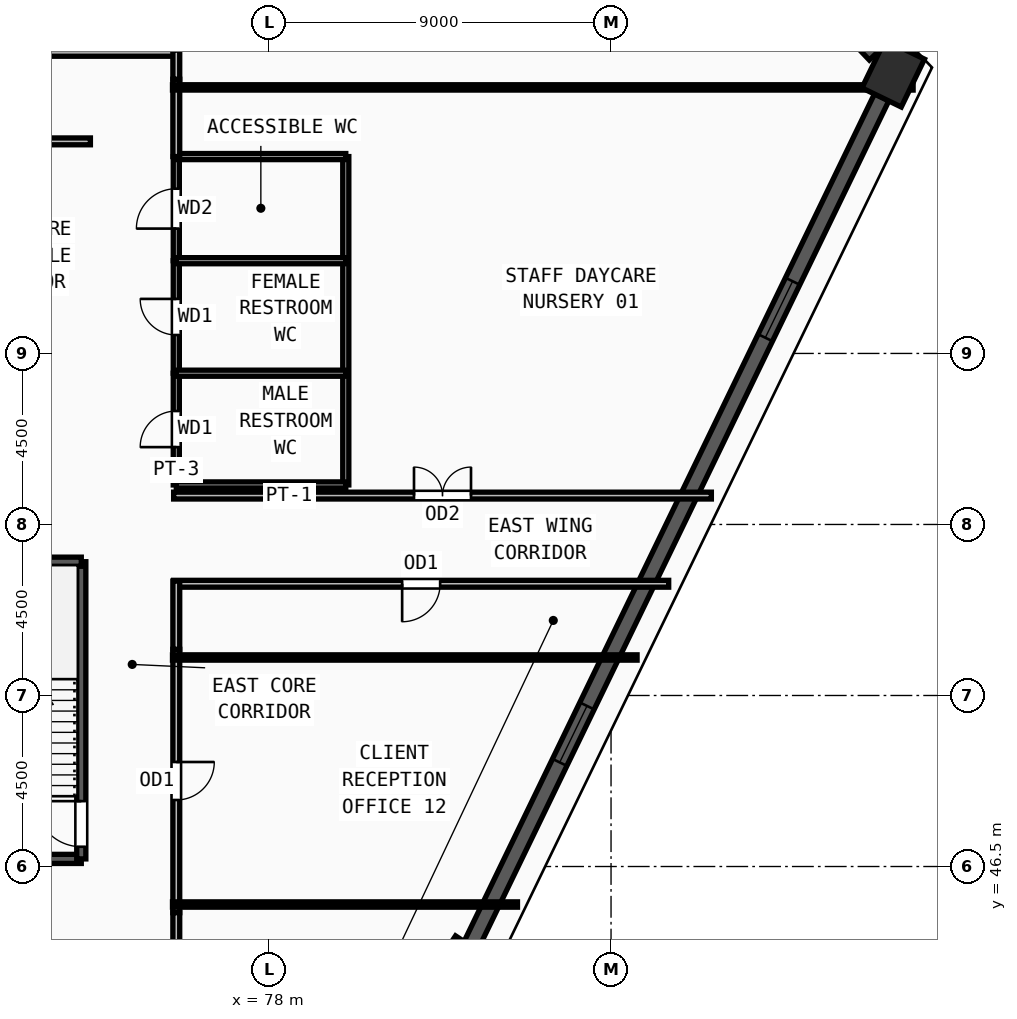
"""IFC4 building model, lengths in metres.
Left out: names, types, materials, properties, quantities, classifications, styles, units other than length and angle.
Written with IfcOpenShell. Run it as: python <this file> out.ifc"""

import sys

from ifc_helpers import new_model, si_unit, direction, frame, frame_2d, origin, origin_2d, place, context, subcontext, project, spatial, rectangle, extrude, source, transform, mapped, element, fill, save


model = new_model("IFC4")
c1 = context("Model", 3, precision=1e-05, world=origin(), true_north=direction((0.0, 1.0)))
c2 = subcontext(c1, "Body", "Model", "MODEL_VIEW")
j1 = project(units=[si_unit("LENGTHUNIT", "METRE"), si_unit("PLANEANGLEUNIT", "RADIAN")], contexts=[c1])
p1 = place(None, origin())
s1 = spatial("IfcSite", under=j1, at=p1, CompositionType="ELEMENT")
p2 = place(p1, origin())
s2 = spatial("IfcBuilding", under=s1, at=p2, CompositionType="ELEMENT")
p3 = place(p2, frame((0.0, 0.0, 177.75)))
s3 = spatial("IfcBuildingStorey", under=s2, at=p3, CompositionType="ELEMENT", Elevation=177.75)
m1 = source(origin(), c2, "Body", "SweptSolid", [
    extrude(rectangle(XDim=1.4, YDim=1.15, at=origin_2d()), origin(), (0.0, 0.0, 1.0), 3.75),
])
for number, where, z_axis, x_axis in (
    (1, (94.425, 67.365, 0.0), (0.0, 0.0, 1.0), (0.436, 0.9, 0.0)),
    (2, (83.002, 43.774, 0.0), (0.0, 0.0, 1.0), (0.552, 0.834, 0.0)),
):
    element("IfcColumn", number, at=place(p3, frame(where, z_axis=z_axis, x_axis=x_axis)), inside=s3, PredefinedType="COLUMN", context=c2, shape_type="MappedRepresentation", body=[
        mapped(m1, transform((0.0, 0.0, 0.0), x_axis=(1.0, 0.0, 0.0), y_axis=(0.0, 1.0, 0.0), z_axis=(0.0, 0.0, 1.0), scale=1.0)),
    ])
p4 = place(p3, frame((83.303, 44.395, 0.0), z_axis=(0.0, 0.0, 1.0), x_axis=(0.435791696433, 0.90004755281, 0.0)))
e3 = element("IfcWall", 3, at=p4, inside=s3, PredefinedType="SOLIDWALL", context=c2, shape_type="SweptSolid", body=[
    extrude(rectangle(XDim=24.831, YDim=0.42, at=frame_2d((12.416, 0.0))), origin(), (0.0, 0.0, 1.0), 3.57),
])
m2 = source(origin(), c2, "Body", "SweptSolid", [
    extrude(rectangle(XDim=1.65, YDim=1.95, at=frame_2d((0.825, 0.975))), frame((0.0, 0.22, 0.0), z_axis=(0.0, -1.0, 0.0), x_axis=(1.0, 0.0, 0.0)), (0.0, 0.0, 1.0), 0.44),
])
p5 = place(p4, frame((5.383, 0.0, 0.55)))
e4 = element("IfcOpeningElement", 4, at=p5, cuts=e3, PredefinedType="OPENING", context=c2, shape_type="MappedRepresentation", body=[
    mapped(m2, transform((0.0, 0.0, 0.0), x_axis=(1.0, 0.0, 0.0), y_axis=(0.0, 1.0, 0.0), z_axis=(0.0, 0.0, 1.0), scale=1.0)),
])
p6 = place(p4, frame((17.798, 0.0, 0.55)))
e5 = element("IfcOpeningElement", 5, at=p6, cuts=e3, PredefinedType="OPENING", context=c2, shape_type="MappedRepresentation", body=[
    mapped(m2, transform((0.0, 0.0, 0.0), x_axis=(1.0, 0.0, 0.0), y_axis=(0.0, 1.0, 0.0), z_axis=(0.0, 0.0, 1.0), scale=1.0)),
])
p7 = place(p3, frame((93.949, 67.865, 0.0), z_axis=(0.0, 0.0, 1.0), x_axis=(-0.68923569457, 0.724537202171, 0.0)))
e6 = element("IfcWall", 6, at=p7, inside=s3, PredefinedType="SOLIDWALL", context=c2, shape_type="SweptSolid", body=[
    extrude(rectangle(XDim=4.419, YDim=0.42, at=frame_2d((2.209, 0.0))), origin(), (0.0, 0.0, 1.0), 3.57),
])
m3 = source(origin(), c2, "Body", "SweptSolid", [
    extrude(rectangle(XDim=1.2, YDim=1.9, at=frame_2d((0.6, 0.95))), frame((0.0, 0.22, 0.0), z_axis=(0.0, -1.0, 0.0), x_axis=(1.0, 0.0, 0.0)), (0.0, 0.0, 1.0), 0.44),
])
p8 = place(p7, frame((1.61, 0.0, 0.55)))
e7 = element("IfcOpeningElement", 7, at=p8, cuts=e6, PredefinedType="OPENING", context=c2, shape_type="MappedRepresentation", body=[
    mapped(m3, transform((0.0, 0.0, 0.0), x_axis=(1.0, 0.0, 0.0), y_axis=(0.0, 1.0, 0.0), z_axis=(0.0, 0.0, 1.0), scale=1.0)),
])
p9 = place(p3, frame((69.62, 46.7, 0.0), z_axis=(0.0, 0.0, 1.0), x_axis=(1.0, 0.0, 0.0)))
e8 = element("IfcWall", 8, at=p9, inside=s3, PredefinedType="SOLIDWALL", context=c2, shape_type="SweptSolid", body=[
    extrude(rectangle(XDim=3.44, YDim=0.24, at=frame_2d((1.72, 0.0))), origin(), (0.0, 0.0, 1.0), 3.57),
])
p10 = place(p3, frame((73.06, 46.7, 0.0), z_axis=(0.0, 0.0, 1.0), x_axis=(0.0, 1.0, 0.0)))
e9 = element("IfcWall", 9, at=p10, inside=s3, PredefinedType="SOLIDWALL", context=c2, shape_type="SweptSolid", body=[
    extrude(rectangle(XDim=7.82, YDim=0.24, at=frame_2d((3.91, 0.0))), origin(), (0.0, 0.0, 1.0), 3.57),
])
m4 = source(origin(), c2, "Body", "SweptSolid", [
    extrude(rectangle(XDim=1.2, YDim=2.2, at=frame_2d((0.6, 1.1))), frame((0.0, 0.13, 0.0), z_axis=(0.0, -1.0, 0.0), x_axis=(1.0, 0.0, 0.0)), (0.0, 0.0, 1.0), 0.26),
])
p11 = place(p10, frame((0.32, 0.0, 0.0)))
e10 = element("IfcOpeningElement", 10, at=p11, cuts=e9, PredefinedType="OPENING", context=c2, shape_type="MappedRepresentation", body=[
    mapped(m4, transform((0.0, 0.0, 0.0), x_axis=(1.0, 0.0, 0.0), y_axis=(0.0, 1.0, 0.0), z_axis=(0.0, 0.0, 1.0), scale=1.0)),
])
p12 = place(p3, frame((73.06, 54.52, 0.0), z_axis=(0.0, 0.0, 1.0), x_axis=(-1.0, 0.0, 0.0)))
e11 = element("IfcWall", 11, at=p12, inside=s3, PredefinedType="SOLIDWALL", context=c2, shape_type="SweptSolid", body=[
    extrude(rectangle(XDim=3.44, YDim=0.24, at=frame_2d((1.72, 0.0))), origin(), (0.0, 0.0, 1.0), 3.57),
])
p13 = place(p3, frame((75.56, 56.54, 0.0), z_axis=(0.0, 0.0, 1.0), x_axis=(0.0, 1.0, 0.0)))
e12 = element("IfcWall", 12, at=p13, inside=s3, PredefinedType="PARTITIONING", context=c2, shape_type="SweptSolid", body=[
    extrude(rectangle(XDim=2.94, YDim=0.16, at=frame_2d((1.47, 0.0))), origin(), (0.0, 0.0, 1.0), 3.57),
])
m5 = source(origin(), c2, "Body", "SweptSolid", [
    extrude(rectangle(XDim=0.95, YDim=2.15, at=frame_2d((0.475, 1.075))), frame((0.0, 0.09, 0.0), z_axis=(0.0, -1.0, 0.0), x_axis=(1.0, 0.0, 0.0)), (0.0, 0.0, 1.0), 0.18),
])
p14 = place(p13, frame((0.995, 0.0, 0.0)))
e13 = element("IfcOpeningElement", 13, at=p14, cuts=e12, PredefinedType="OPENING", context=c2, shape_type="MappedRepresentation", body=[
    mapped(m5, transform((0.0, 0.0, 0.0), x_axis=(1.0, 0.0, 0.0), y_axis=(0.0, 1.0, 0.0), z_axis=(0.0, 0.0, 1.0), scale=1.0)),
])
p15 = place(p3, frame((75.56, 59.48, 0.0), z_axis=(0.0, 0.0, 1.0), x_axis=(0.0, 1.0, 0.0)))
e14 = element("IfcWall", 14, at=p15, inside=s3, PredefinedType="PARTITIONING", context=c2, shape_type="SweptSolid", body=[
    extrude(rectangle(XDim=2.96, YDim=0.16, at=frame_2d((1.48, 0.0))), origin(), (0.0, 0.0, 1.0), 3.57),
])
p16 = place(p15, frame((1.005, 0.0, 0.0)))
e15 = element("IfcOpeningElement", 15, at=p16, cuts=e14, PredefinedType="OPENING", context=c2, shape_type="MappedRepresentation", body=[
    mapped(m5, transform((0.0, 0.0, 0.0), x_axis=(1.0, 0.0, 0.0), y_axis=(0.0, 1.0, 0.0), z_axis=(0.0, 0.0, 1.0), scale=1.0)),
])
p17 = place(p3, frame((75.56, 62.44, 0.0), z_axis=(0.0, 0.0, 1.0), x_axis=(0.0, 1.0, 0.0)))
e16 = element("IfcWall", 16, at=p17, inside=s3, PredefinedType="PARTITIONING", context=c2, shape_type="SweptSolid", body=[
    extrude(rectangle(XDim=2.74, YDim=0.16, at=frame_2d((1.37, 0.0))), origin(), (0.0, 0.0, 1.0), 3.57),
])
m6 = source(origin(), c2, "Body", "SweptSolid", [
    extrude(rectangle(XDim=1.05, YDim=2.15, at=frame_2d((0.525, 1.075))), frame((0.0, 0.09, 0.0), z_axis=(0.0, -1.0, 0.0), x_axis=(1.0, 0.0, 0.0)), (0.0, 0.0, 1.0), 0.18),
])
p18 = place(p17, frame((0.845, 0.0, 0.0)))
e17 = element("IfcOpeningElement", 17, at=p18, cuts=e16, PredefinedType="OPENING", context=c2, shape_type="MappedRepresentation", body=[
    mapped(m6, transform((0.0, 0.0, 0.0), x_axis=(1.0, 0.0, 0.0), y_axis=(0.0, 1.0, 0.0), z_axis=(0.0, 0.0, 1.0), scale=1.0)),
])
p19 = place(p3, frame((69.46, 65.58, 0.0), z_axis=(0.0, 0.0, 1.0), x_axis=(1.0, 0.0, 0.0)))
e18 = element("IfcWall", 18, at=p19, inside=s3, PredefinedType="PARTITIONING", context=c2, shape_type="SweptSolid", body=[
    extrude(rectangle(XDim=3.84, YDim=0.18, at=frame_2d((1.92, 0.0))), origin(), (0.0, 0.0, 1.0), 3.57),
])
m7 = source(origin(), c2, "Body", "SweptSolid", [
    extrude(rectangle(XDim=1.3, YDim=2.2, at=frame_2d((0.65, 1.1))), frame((0.0, 0.1, 0.0), z_axis=(0.0, -1.0, 0.0), x_axis=(1.0, 0.0, 0.0)), (0.0, 0.0, 1.0), 0.2),
])
p20 = place(p19, frame((1.27, 0.0, 0.0)))
e19 = element("IfcOpeningElement", 19, at=p20, cuts=e18, PredefinedType="OPENING", context=c2, shape_type="MappedRepresentation", body=[
    mapped(m7, transform((0.0, 0.0, 0.0), x_axis=(1.0, 0.0, 0.0), y_axis=(0.0, 1.0, 0.0), z_axis=(0.0, 0.0, 1.0), scale=1.0)),
])
p21 = place(p3, frame((75.49, 56.26, 0.0), z_axis=(0.0, 0.0, 1.0), x_axis=(1.0, 0.0, 0.0)))
e20 = element("IfcWall", 20, at=p21, inside=s3, PredefinedType="PARTITIONING", context=c2, shape_type="SweptSolid", body=[
    extrude(rectangle(XDim=14.15, YDim=0.18, at=frame_2d((7.075, 0.0))), origin(), (0.0, 0.0, 1.0), 3.57),
])
m8 = source(origin(), c2, "Body", "SweptSolid", [
    extrude(rectangle(XDim=1.5, YDim=2.2, at=frame_2d((0.75, 1.1))), frame((0.0, 0.1, 0.0), z_axis=(0.0, -1.0, 0.0), x_axis=(1.0, 0.0, 0.0)), (0.0, 0.0, 1.0), 0.2),
])
p22 = place(p21, frame((6.325, 0.0, 0.0)))
e21 = element("IfcOpeningElement", 21, at=p22, cuts=e20, PredefinedType="OPENING", context=c2, shape_type="MappedRepresentation", body=[
    mapped(m8, transform((0.0, 0.0, 0.0), x_axis=(1.0, 0.0, 0.0), y_axis=(0.0, 1.0, 0.0), z_axis=(0.0, 0.0, 1.0), scale=1.0)),
])
p23 = place(p3, frame((62.785, 67.91, 0.0), z_axis=(0.0, 0.0, 1.0), x_axis=(1.0, 0.0, 0.0)))
e22 = element("IfcWall", 22, at=p23, inside=s3, PredefinedType="PARTITIONING", context=c2, shape_type="SweptSolid", body=[
    extrude(rectangle(XDim=12.845, YDim=0.18, at=frame_2d((6.422, 0.0))), origin(), (0.0, 0.0, 1.0), 3.57),
])
p24 = place(p23, frame((5.672, 0.0, 0.0)))
e23 = element("IfcOpeningElement", 23, at=p24, cuts=e22, PredefinedType="OPENING", context=c2, shape_type="MappedRepresentation", body=[
    mapped(m8, transform((0.0, 0.0, 0.0), x_axis=(1.0, 0.0, 0.0), y_axis=(0.0, 1.0, 0.0), z_axis=(0.0, 0.0, 1.0), scale=1.0)),
])
p25 = place(p3, frame((75.56, 52.215, 0.0), z_axis=(0.0, 0.0, 1.0), x_axis=(0.0, -1.0, 0.0)))
e24 = element("IfcWall", 24, at=p25, inside=s3, PredefinedType="PARTITIONING", context=c2, shape_type="SweptSolid", body=[
    extrude(rectangle(XDim=6.93, YDim=0.18, at=frame_2d((3.465, 0.0))), origin(), (0.0, 0.0, 1.0), 3.155),
])
m9 = source(origin(), c2, "Body", "SweptSolid", [
    extrude(rectangle(XDim=1.0, YDim=2.2, at=frame_2d((0.5, 1.1))), frame((0.0, 0.1, 0.0), z_axis=(0.0, -1.0, 0.0), x_axis=(1.0, 0.0, 0.0)), (0.0, 0.0, 1.0), 0.2),
])
p26 = place(p25, frame((2.965, 0.0, 0.0)))
e25 = element("IfcOpeningElement", 25, at=p26, cuts=e24, PredefinedType="OPENING", context=c2, shape_type="MappedRepresentation", body=[
    mapped(m9, transform((0.0, 0.0, 0.0), x_axis=(1.0, 0.0, 0.0), y_axis=(0.0, 1.0, 0.0), z_axis=(0.0, 0.0, 1.0), scale=1.0)),
])
p27 = place(p3, frame((88.517, 53.94, 0.0), z_axis=(0.0, 0.0, 1.0), x_axis=(-1.0, 0.0, 0.0)))
e26 = element("IfcWall", 26, at=p27, inside=s3, PredefinedType="PARTITIONING", context=c2, shape_type="SweptSolid", body=[
    extrude(rectangle(XDim=13.027, YDim=0.18, at=frame_2d((6.514, 0.0))), origin(), (0.0, 0.0, 1.0), 3.57),
])
p28 = place(p27, frame((6.014, 0.0, 0.0)))
e27 = element("IfcOpeningElement", 27, at=p28, cuts=e26, PredefinedType="OPENING", context=c2, shape_type="MappedRepresentation", body=[
    mapped(m9, transform((0.0, 0.0, 0.0), x_axis=(1.0, 0.0, 0.0), y_axis=(0.0, 1.0, 0.0), z_axis=(0.0, 0.0, 1.0), scale=1.0)),
])
p29 = place(p3, frame((80.02, 56.54, 0.0), z_axis=(0.0, 0.0, 1.0), x_axis=(0.0, 1.0, 0.0)))
e28 = element("IfcWall", 28, at=p29, inside=s3, PredefinedType="PARTITIONING", context=c2, shape_type="SweptSolid", body=[
    extrude(rectangle(XDim=8.64, YDim=0.16, at=frame_2d((4.32, 0.0))), origin(), (0.0, 0.0, 1.0), 3.57),
])
for number, where, z_axis, x_axis in (
    (29, (75.56, 56.54, 0.0), (0.0, 0.0, 1.0), (1.0, 0.0, 0.0)),
    (30, (75.56, 59.48, 0.0), (0.0, 0.0, 1.0), (1.0, 0.0, 0.0)),
    (31, (75.56, 62.44, 0.0), (0.0, 0.0, 1.0), (1.0, 0.0, 0.0)),
    (32, (75.56, 65.18, 0.0), (0.0, 0.0, 1.0), (1.0, 0.0, 0.0)),
):
    element("IfcWall", number, at=place(p3, frame(where, z_axis=z_axis, x_axis=x_axis)), inside=s3, PredefinedType="PARTITIONING", context=c2, shape_type="SweptSolid", body=[
        extrude(rectangle(XDim=4.46, YDim=0.16, at=frame_2d((2.23, 0.0))), origin(), (0.0, 0.0, 1.0), 3.57),
    ])
p30 = place(p3, frame((75.56, 67.215, 0.0), z_axis=(0.0, 0.0, 1.0), x_axis=(0.0, -1.0, 0.0)))
e33 = element("IfcWall", 33, at=p30, inside=s3, PredefinedType="PARTITIONING", context=c2, shape_type="SweptSolid", body=[
    extrude(rectangle(XDim=2.035, YDim=0.18, at=frame_2d((1.018, 0.0))), origin(), (0.0, 0.0, 1.0), 3.57),
])
p31 = place(p3, frame((75.56, 67.98, 0.0), z_axis=(0.0, 0.0, 1.0), x_axis=(0.0, -1.0, 0.0)))
e34 = element("IfcWall", 34, at=p31, inside=s3, PredefinedType="PARTITIONING", context=c2, shape_type="SweptSolid", body=[
    extrude(rectangle(XDim=0.765, YDim=0.18, at=frame_2d((0.382, 0.0))), origin(), (0.0, 0.0, 1.0), 3.57),
])
p32 = place(p3, frame((75.56, 45.285, 0.0), z_axis=(0.0, 0.0, 1.0), x_axis=(0.0, -1.0, 0.0)))
e35 = element("IfcWall", 35, at=p32, inside=s3, PredefinedType="PARTITIONING", context=c2, shape_type="SweptSolid", body=[
    extrude(rectangle(XDim=1.615, YDim=0.18, at=frame_2d((0.808, 0.0))), origin(), (0.0, 0.0, 1.0), 3.57),
])
p33 = place(p3, frame((75.56, 54.01, 0.0), z_axis=(0.0, 0.0, 1.0), x_axis=(0.0, -1.0, 0.0)))
e36 = element("IfcWall", 36, at=p33, inside=s3, PredefinedType="PARTITIONING", context=c2, shape_type="SweptSolid", body=[
    extrude(rectangle(XDim=1.795, YDim=0.18, at=frame_2d((0.897, 0.0))), origin(), (0.0, 0.0, 1.0), 3.57),
])
p34 = place(p3, frame((75.46, 45.5, 0.0), z_axis=(0.0, 0.0, 1.0), x_axis=(1.0, 0.0, 0.0)))
e37 = element("IfcWall", 37, at=p34, inside=s3, PredefinedType="PARTITIONING", context=c2, shape_type="SweptSolid", body=[
    extrude(rectangle(XDim=9.078, YDim=0.14, at=frame_2d((4.539, 0.0))), origin(), (0.0, 0.0, 1.0), 3.57),
])
p35 = place(p3, frame((75.46, 52.0, 0.0), z_axis=(0.0, 0.0, 1.0), x_axis=(1.0, 0.0, 0.0)))
e38 = element("IfcWall", 38, at=p35, inside=s3, PredefinedType="PARTITIONING", context=c2, shape_type="SweptSolid", body=[
    extrude(rectangle(XDim=12.225, YDim=0.14, at=frame_2d((6.113, 0.0))), origin(), (0.0, 0.0, 1.0), 3.57),
])
p36 = place(p3, frame((75.46, 67.0, 0.0), z_axis=(0.0, 0.0, 1.0), x_axis=(1.0, 0.0, 0.0)))
e39 = element("IfcWall", 39, at=p36, inside=s3, PredefinedType="PARTITIONING", context=c2, shape_type="SweptSolid", body=[
    extrude(rectangle(XDim=19.489, YDim=0.14, at=frame_2d((9.745, 0.0))), origin(), (0.0, 0.0, 1.0), 2.755),
])
m10 = source(origin(), c2, "Body", "SweptSolid", [
    extrude(rectangle(XDim=1.65, YDim=1.95, at=frame_2d((0.825, 0.975))), frame((0.0, 0.03, 0.0), z_axis=(0.0, -1.0, 0.0), x_axis=(1.0, 0.0, 0.0)), (0.0, 0.0, 1.0), 0.06),
])
p37 = place(p5, origin())
e40 = element("IfcWindow", 40, at=p37, inside=s3, PartitioningType="DOUBLE_PANEL_VERTICAL", PredefinedType="WINDOW", context=c2, shape_type="MappedRepresentation", body=[
    mapped(m10, transform((0.0, 0.0, 0.0), x_axis=(1.0, 0.0, 0.0), y_axis=(0.0, 1.0, 0.0), z_axis=(0.0, 0.0, 1.0), scale=1.0)),
])
fill(e4, e40)
p38 = place(p6, origin())
e41 = element("IfcWindow", 41, at=p38, inside=s3, PartitioningType="DOUBLE_PANEL_VERTICAL", PredefinedType="WINDOW", context=c2, shape_type="MappedRepresentation", body=[
    mapped(m10, transform((0.0, 0.0, 0.0), x_axis=(1.0, 0.0, 0.0), y_axis=(0.0, 1.0, 0.0), z_axis=(0.0, 0.0, 1.0), scale=1.0)),
])
fill(e5, e41)
m11 = source(origin(), c2, "Body", "SweptSolid", [
    extrude(rectangle(XDim=1.2, YDim=2.2, at=frame_2d((0.6, 1.1))), frame((0.0, 0.025, 0.0), z_axis=(0.0, -1.0, 0.0), x_axis=(1.0, 0.0, 0.0)), (0.0, 0.0, 1.0), 0.05),
])
p39 = place(p11, origin())
e42 = element("IfcDoor", 42, at=p39, inside=s3, OperationType="SINGLE_SWING_RIGHT", PredefinedType="DOOR", context=c2, shape_type="MappedRepresentation", body=[
    mapped(m11, transform((0.0, 0.0, 0.0), x_axis=(1.0, 0.0, 0.0), y_axis=(0.0, 1.0, 0.0), z_axis=(0.0, 0.0, 1.0), scale=1.0)),
])
fill(e10, e42)
m12 = source(origin(), c2, "Body", "SweptSolid", [
    extrude(rectangle(XDim=0.95, YDim=2.15, at=frame_2d((0.475, 1.075))), frame((0.0, 0.025, 0.0), z_axis=(0.0, -1.0, 0.0), x_axis=(1.0, 0.0, 0.0)), (0.0, 0.0, 1.0), 0.05),
])
p40 = place(p14, origin())
e43 = element("IfcDoor", 43, at=p40, inside=s3, OperationType="SINGLE_SWING_LEFT", PredefinedType="DOOR", context=c2, shape_type="MappedRepresentation", body=[
    mapped(m12, transform((0.0, 0.0, 0.0), x_axis=(1.0, 0.0, 0.0), y_axis=(0.0, 1.0, 0.0), z_axis=(0.0, 0.0, 1.0), scale=1.0)),
])
fill(e13, e43)
p41 = place(p16, origin())
e44 = element("IfcDoor", 44, at=p41, inside=s3, OperationType="SINGLE_SWING_RIGHT", PredefinedType="DOOR", context=c2, shape_type="MappedRepresentation", body=[
    mapped(m12, transform((0.0, 0.0, 0.0), x_axis=(1.0, 0.0, 0.0), y_axis=(0.0, 1.0, 0.0), z_axis=(0.0, 0.0, 1.0), scale=1.0)),
])
fill(e15, e44)
m13 = source(origin(), c2, "Body", "SweptSolid", [
    extrude(rectangle(XDim=1.05, YDim=2.15, at=frame_2d((0.525, 1.075))), frame((0.0, 0.025, 0.0), z_axis=(0.0, -1.0, 0.0), x_axis=(1.0, 0.0, 0.0)), (0.0, 0.0, 1.0), 0.05),
])
p42 = place(p18, origin())
e45 = element("IfcDoor", 45, at=p42, inside=s3, OperationType="SINGLE_SWING_LEFT", PredefinedType="DOOR", context=c2, shape_type="MappedRepresentation", body=[
    mapped(m13, transform((0.0, 0.0, 0.0), x_axis=(1.0, 0.0, 0.0), y_axis=(0.0, 1.0, 0.0), z_axis=(0.0, 0.0, 1.0), scale=1.0)),
])
fill(e17, e45)
m14 = source(origin(), c2, "Body", "SweptSolid", [
    extrude(rectangle(XDim=1.5, YDim=2.2, at=frame_2d((0.75, 1.1))), frame((0.0, 0.025, 0.0), z_axis=(0.0, -1.0, 0.0), x_axis=(1.0, 0.0, 0.0)), (0.0, 0.0, 1.0), 0.05),
])
p43 = place(p22, origin())
e46 = element("IfcDoor", 46, at=p43, inside=s3, OperationType="DOUBLE_DOOR_SINGLE_SWING", PredefinedType="DOOR", context=c2, shape_type="MappedRepresentation", body=[
    mapped(m14, transform((0.0, 0.0, 0.0), x_axis=(1.0, 0.0, 0.0), y_axis=(0.0, 1.0, 0.0), z_axis=(0.0, 0.0, 1.0), scale=1.0)),
])
fill(e21, e46)
m15 = source(origin(), c2, "Body", "SweptSolid", [
    extrude(rectangle(XDim=1.0, YDim=2.2, at=frame_2d((0.5, 1.1))), frame((0.0, 0.025, 0.0), z_axis=(0.0, -1.0, 0.0), x_axis=(1.0, 0.0, 0.0)), (0.0, 0.0, 1.0), 0.05),
])
p44 = place(p26, origin())
e47 = element("IfcDoor", 47, at=p44, inside=s3, OperationType="SINGLE_SWING_LEFT", PredefinedType="DOOR", context=c2, shape_type="MappedRepresentation", body=[
    mapped(m15, transform((0.0, 0.0, 0.0), x_axis=(1.0, 0.0, 0.0), y_axis=(0.0, 1.0, 0.0), z_axis=(0.0, 0.0, 1.0), scale=1.0)),
])
fill(e25, e47)
p45 = place(p28, origin())
e48 = element("IfcDoor", 48, at=p45, inside=s3, OperationType="SINGLE_SWING_RIGHT", PredefinedType="DOOR", context=c2, shape_type="MappedRepresentation", body=[
    mapped(m15, transform((0.0, 0.0, 0.0), x_axis=(1.0, 0.0, 0.0), y_axis=(0.0, 1.0, 0.0), z_axis=(0.0, 0.0, 1.0), scale=1.0)),
])
fill(e27, e48)
save(model, sys.argv[1])
